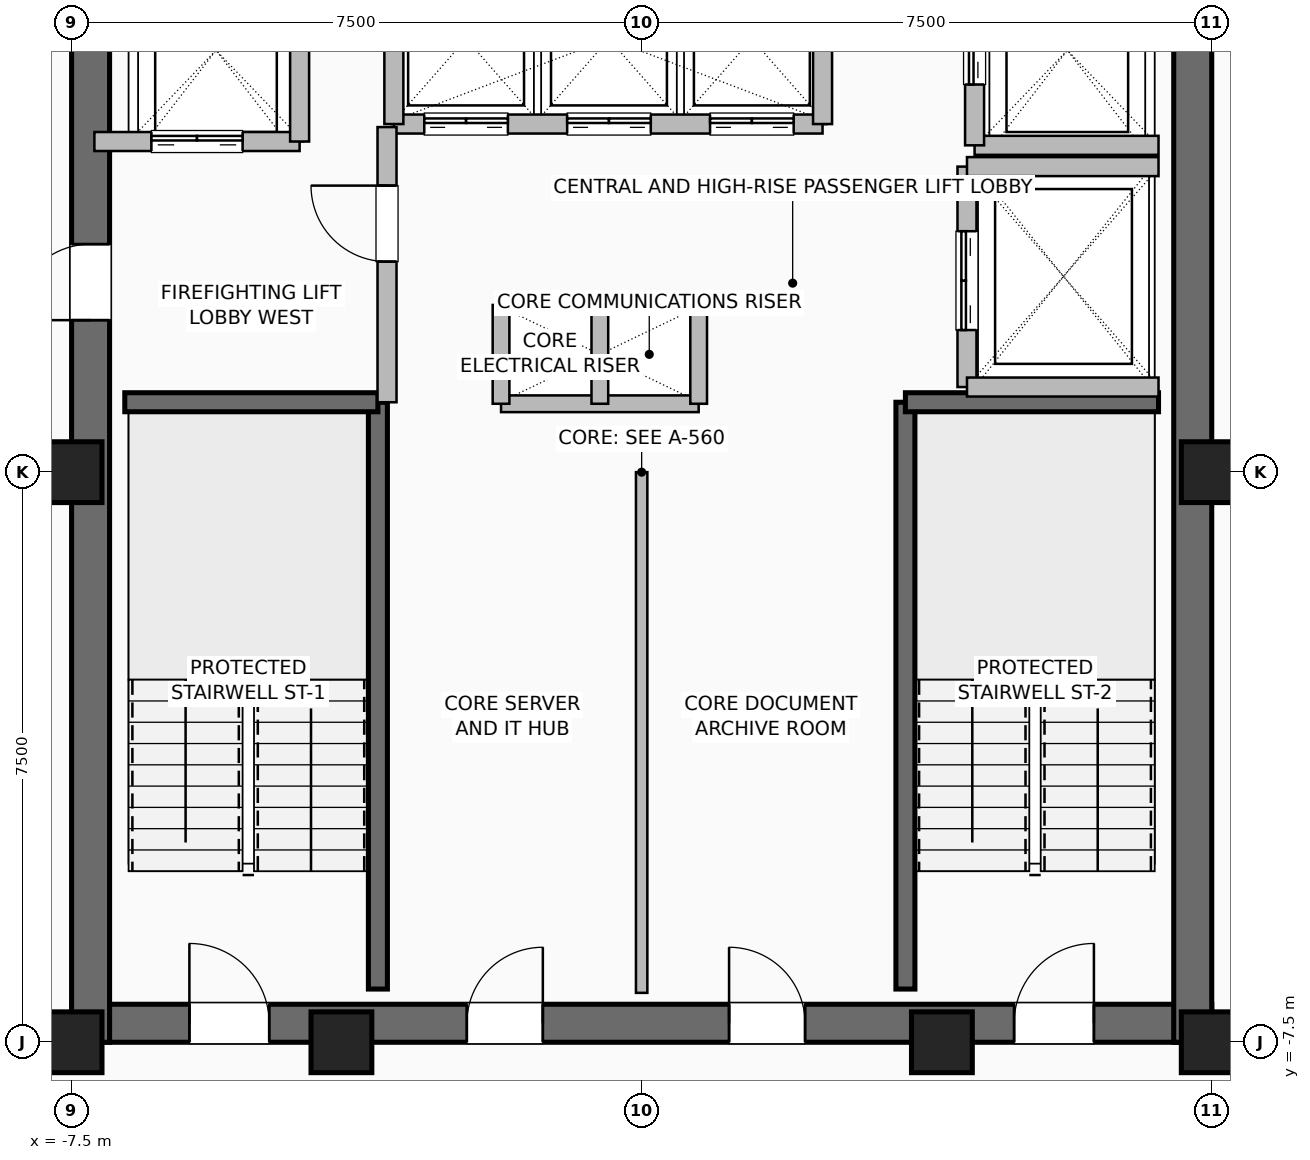
"""IFC4 building model, lengths in metres.
Left out: names, types, materials, properties, quantities, classifications, styles, units other than length and angle.
Written with IfcOpenShell. Run it as: python <this file> out.ifc"""

import sys

from ifc_helpers import new_model, si_unit, direction, frame, frame_2d, origin, origin_2d, place, context, subcontext, project, spatial, rectangle, hollow_rectangle, extrude, element, fill, save


model = new_model("IFC4")
c1 = context("Model", 3, precision=1e-05, world=origin(), true_north=direction((0.0, 1.0)))
c2 = subcontext(c1, "Body", "Model", "MODEL_VIEW")
j1 = project(units=[si_unit("LENGTHUNIT", "METRE"), si_unit("PLANEANGLEUNIT", "RADIAN")], contexts=[c1])
p1 = place(None, origin())
s1 = spatial("IfcSite", under=j1, at=p1, CompositionType="ELEMENT")
p2 = place(p1, origin())
s2 = spatial("IfcBuilding", under=s1, at=p2, CompositionType="ELEMENT")
p3 = place(p2, frame((0.0, 0.0, 239.6)))
s3 = spatial("IfcBuildingStorey", under=s2, at=p3, CompositionType="ELEMENT", Elevation=239.6)
for number, where, z_axis, x_axis in (
    (1, (-7.5, -7.5, 0.0), (0.0, 0.0, 1.0), (1.0, 0.0, 0.0)),
    (2, (-3.95, -7.5, 0.0), (0.0, 0.0, 1.0), (1.0, 0.0, 0.0)),
    (3, (3.95, -7.5, 0.0), (0.0, 0.0, 1.0), (1.0, 0.0, 0.0)),
    (4, (7.5, -7.5, 0.0), (0.0, 0.0, 1.0), (1.0, 0.0, 0.0)),
    (5, (7.5, 0.0, 0.0), (0.0, 0.0, 1.0), (1.0, 0.0, 0.0)),
    (6, (-7.5, 0.0, 0.0), (0.0, 0.0, 1.0), (1.0, 0.0, 0.0)),
):
    element("IfcColumn", number, at=place(p3, frame(where, z_axis=z_axis, x_axis=x_axis)), inside=s3, PredefinedType="COLUMN", context=c2, shape_type="SweptSolid", body=[
        extrude(hollow_rectangle(XDim=0.8, YDim=0.8, WallThickness=0.04, at=origin_2d()), origin(), (0.0, 0.0, 1.0), 3.6),
    ])
p4 = place(p3, frame((-7.5, -7.25, 0.0), z_axis=(0.0, 0.0, 1.0), x_axis=(1.0, 0.0, 0.0)))
e7 = element("IfcWall", 7, at=p4, inside=s3, PredefinedType="SHEAR", context=c2, shape_type="SweptSolid", body=[
    extrude(rectangle(XDim=15.0, YDim=0.5, at=frame_2d((7.5, 0.0))), origin(), (0.0, 0.0, 1.0), 3.36),
])
p5 = place(p4, frame((1.55, 0.0, 0.0)))
e8 = element("IfcOpeningElement", 8, at=p5, cuts=e7, PredefinedType="OPENING", context=c2, shape_type="SweptSolid", body=[
    extrude(rectangle(XDim=1.05, YDim=2.08, at=frame_2d((0.525, 1.04))), frame((0.0, 0.26, 0.0), z_axis=(0.0, -1.0, 0.0), x_axis=(1.0, 0.0, 0.0)), (0.0, 0.0, 1.0), 0.52),
])
p6 = place(p4, frame((12.4, 0.0, 0.0)))
e9 = element("IfcOpeningElement", 9, at=p6, cuts=e7, PredefinedType="OPENING", context=c2, shape_type="SweptSolid", body=[
    extrude(rectangle(XDim=1.05, YDim=2.08, at=frame_2d((0.525, 1.04))), frame((0.0, 0.26, 0.0), z_axis=(0.0, -1.0, 0.0), x_axis=(1.0, 0.0, 0.0)), (0.0, 0.0, 1.0), 0.52),
])
p7 = place(p4, frame((5.2, 0.0, 0.0)))
e10 = element("IfcOpeningElement", 10, at=p7, cuts=e7, PredefinedType="OPENING", context=c2, shape_type="SweptSolid", body=[
    extrude(rectangle(XDim=1.0, YDim=2.08, at=frame_2d((0.5, 1.04))), frame((0.0, 0.26, 0.0), z_axis=(0.0, -1.0, 0.0), x_axis=(1.0, 0.0, 0.0)), (0.0, 0.0, 1.0), 0.52),
])
p8 = place(p4, frame((8.65, 0.0, 0.0)))
e11 = element("IfcOpeningElement", 11, at=p8, cuts=e7, PredefinedType="OPENING", context=c2, shape_type="SweptSolid", body=[
    extrude(rectangle(XDim=1.0, YDim=2.08, at=frame_2d((0.5, 1.04))), frame((0.0, 0.26, 0.0), z_axis=(0.0, -1.0, 0.0), x_axis=(1.0, 0.0, 0.0)), (0.0, 0.0, 1.0), 0.52),
])
p9 = place(p3, frame((-7.25, -7.5, 0.0), z_axis=(0.0, 0.0, 1.0), x_axis=(0.0, 1.0, 0.0)))
e12 = element("IfcWall", 12, at=p9, inside=s3, PredefinedType="SHEAR", context=c2, shape_type="SweptSolid", body=[
    extrude(rectangle(XDim=15.0, YDim=0.5, at=frame_2d((7.5, 0.0))), origin(), (0.0, 0.0, 1.0), 3.36),
])
p10 = place(p9, frame((9.5, 0.0, 0.0)))
e13 = element("IfcOpeningElement", 13, at=p10, cuts=e12, PredefinedType="OPENING", context=c2, shape_type="SweptSolid", body=[
    extrude(rectangle(XDim=1.0, YDim=2.08, at=frame_2d((0.5, 1.04))), frame((0.0, 0.26, 0.0), z_axis=(0.0, -1.0, 0.0), x_axis=(1.0, 0.0, 0.0)), (0.0, 0.0, 1.0), 0.52),
])
p11 = place(p3, frame((7.25, -7.5, 0.0), z_axis=(0.0, 0.0, 1.0), x_axis=(0.0, 1.0, 0.0)))
e14 = element("IfcWall", 14, at=p11, inside=s3, PredefinedType="SHEAR", context=c2, shape_type="SweptSolid", body=[
    extrude(rectangle(XDim=15.0, YDim=0.5, at=frame_2d((7.5, 0.0))), origin(), (0.0, 0.0, 1.0), 3.36),
])
p12 = place(p3, frame((-3.47, -6.8, 0.0), z_axis=(0.0, 0.0, 1.0), x_axis=(0.0, 1.0, 0.0)))
e15 = element("IfcWall", 15, at=p12, inside=s3, PredefinedType="SHEAR", context=c2, shape_type="SweptSolid", body=[
    extrude(rectangle(XDim=7.72, YDim=0.25, at=frame_2d((3.86, 0.0))), origin(), (0.0, 0.0, 1.0), 3.36),
])
p13 = place(p3, frame((-6.8, 0.92, 0.0), z_axis=(0.0, 0.0, 1.0), x_axis=(1.0, 0.0, 0.0)))
e16 = element("IfcWall", 16, at=p13, inside=s3, PredefinedType="SHEAR", context=c2, shape_type="SweptSolid", body=[
    extrude(rectangle(XDim=3.33, YDim=0.25, at=frame_2d((1.665, 0.0))), origin(), (0.0, 0.0, 1.0), 3.36),
])
p14 = place(p3, frame((3.47, -6.8, 0.0), z_axis=(0.0, 0.0, 1.0), x_axis=(0.0, 1.0, 0.0)))
e17 = element("IfcWall", 17, at=p14, inside=s3, PredefinedType="SHEAR", context=c2, shape_type="SweptSolid", body=[
    extrude(rectangle(XDim=7.72, YDim=0.25, at=frame_2d((3.86, 0.0))), origin(), (0.0, 0.0, 1.0), 3.36),
])
p15 = place(p3, frame((3.47, 0.92, 0.0), z_axis=(0.0, 0.0, 1.0), x_axis=(1.0, 0.0, 0.0)))
e18 = element("IfcWall", 18, at=p15, inside=s3, PredefinedType="SHEAR", context=c2, shape_type="SweptSolid", body=[
    extrude(rectangle(XDim=3.33, YDim=0.25, at=frame_2d((1.665, 0.0))), origin(), (0.0, 0.0, 1.0), 3.36),
])
for number, where, z_axis, x_axis in (
    (19, (-1.85, 2.2, 0.0), (0.0, 0.0, 1.0), (1.0, 0.0, 0.0)),
    (20, (-1.85, 0.9, 0.0), (0.0, 0.0, 1.0), (1.0, 0.0, 0.0)),
):
    element("IfcWall", number, at=place(p3, frame(where, z_axis=z_axis, x_axis=x_axis)), inside=s3, PredefinedType="PARTITIONING", context=c2, shape_type="SweptSolid", body=[
        extrude(rectangle(XDim=2.6, YDim=0.22, at=frame_2d((1.3, 0.0))), origin(), (0.0, 0.0, 1.0), 3.36),
    ])
for number, where, z_axis, x_axis in (
    (21, (-0.55, 0.9, 0.0), (0.0, 0.0, 1.0), (0.0, 1.0, 0.0)),
    (22, (0.75, 0.9, 0.0), (0.0, 0.0, 1.0), (0.0, 1.0, 0.0)),
    (23, (-1.85, 0.9, 0.0), (0.0, 0.0, 1.0), (0.0, 1.0, 0.0)),
):
    element("IfcWall", number, at=place(p3, frame(where, z_axis=z_axis, x_axis=x_axis)), inside=s3, PredefinedType="PARTITIONING", context=c2, shape_type="SweptSolid", body=[
        extrude(rectangle(XDim=1.3, YDim=0.22, at=frame_2d((0.65, 0.0))), origin(), (0.0, 0.0, 1.0), 3.36),
    ])
p16 = place(p3, frame((-3.26, 4.58, 0.0), z_axis=(0.0, 0.0, 1.0), x_axis=(1.0, 0.0, 0.0)))
e24 = element("IfcWall", 24, at=p16, inside=s3, PredefinedType="SHEAR", context=c2, shape_type="SweptSolid", body=[
    extrude(rectangle(XDim=5.64, YDim=0.25, at=frame_2d((2.82, 0.0))), origin(), (0.0, 0.0, 1.0), 3.36),
])
p17 = place(p16, frame((0.4, 0.0, 0.0)))
e25 = element("IfcOpeningElement", 25, at=p17, cuts=e24, PredefinedType="OPENING", context=c2, shape_type="SweptSolid", body=[
    extrude(rectangle(XDim=1.1, YDim=2.2, at=frame_2d((0.55, 1.1))), frame((0.0, 0.135, 0.0), z_axis=(0.0, -1.0, 0.0), x_axis=(1.0, 0.0, 0.0)), (0.0, 0.0, 1.0), 0.27),
])
p18 = place(p16, frame((2.28, 0.0, 0.0)))
e26 = element("IfcOpeningElement", 26, at=p18, cuts=e24, PredefinedType="OPENING", context=c2, shape_type="SweptSolid", body=[
    extrude(rectangle(XDim=1.1, YDim=2.2, at=frame_2d((0.55, 1.1))), frame((0.0, 0.135, 0.0), z_axis=(0.0, -1.0, 0.0), x_axis=(1.0, 0.0, 0.0)), (0.0, 0.0, 1.0), 0.27),
])
p19 = place(p16, frame((4.16, 0.0, 0.0)))
e27 = element("IfcOpeningElement", 27, at=p19, cuts=e24, PredefinedType="OPENING", context=c2, shape_type="SweptSolid", body=[
    extrude(rectangle(XDim=1.1, YDim=2.2, at=frame_2d((0.55, 1.1))), frame((0.0, 0.135, 0.0), z_axis=(0.0, -1.0, 0.0), x_axis=(1.0, 0.0, 0.0)), (0.0, 0.0, 1.0), 0.27),
])
for number, where, z_axis, x_axis in (
    (28, (-3.26, 4.58, 0.0), (0.0, 0.0, 1.0), (0.0, 1.0, 0.0)),
    (29, (2.38, 4.58, 0.0), (0.0, 0.0, 1.0), (0.0, 1.0, 0.0)),
):
    element("IfcWall", number, at=place(p3, frame(where, z_axis=z_axis, x_axis=x_axis)), inside=s3, PredefinedType="SHEAR", context=c2, shape_type="SweptSolid", body=[
        extrude(rectangle(XDim=2.22, YDim=0.25, at=frame_2d((1.11, 0.0))), origin(), (0.0, 0.0, 1.0), 3.36),
    ])
p20 = place(p3, frame((-7.2, 4.35, 0.0), z_axis=(0.0, 0.0, 1.0), x_axis=(1.0, 0.0, 0.0)))
e30 = element("IfcWall", 30, at=p20, inside=s3, PredefinedType="SHEAR", context=c2, shape_type="SweptSolid", body=[
    extrude(rectangle(XDim=2.7, YDim=0.25, at=frame_2d((1.35, 0.0))), origin(), (0.0, 0.0, 1.0), 3.36),
])
p21 = place(p20, frame((0.75, 0.0, 0.0)))
e31 = element("IfcOpeningElement", 31, at=p21, cuts=e30, PredefinedType="OPENING", context=c2, shape_type="SweptSolid", body=[
    extrude(rectangle(XDim=1.2, YDim=2.2, at=frame_2d((0.6, 1.1))), frame((0.0, 0.135, 0.0), z_axis=(0.0, -1.0, 0.0), x_axis=(1.0, 0.0, 0.0)), (0.0, 0.0, 1.0), 0.27),
])
p22 = place(p3, frame((-4.5, 4.35, 0.0), z_axis=(0.0, 0.0, 1.0), x_axis=(0.0, 1.0, 0.0)))
e32 = element("IfcWall", 32, at=p22, inside=s3, PredefinedType="SHEAR", context=c2, shape_type="SweptSolid", body=[
    extrude(rectangle(XDim=2.85, YDim=0.25, at=frame_2d((1.425, 0.0))), origin(), (0.0, 0.0, 1.0), 3.36),
])
p23 = place(p3, frame((4.38, 4.3, 0.0), z_axis=(0.0, 0.0, 1.0), x_axis=(1.0, 0.0, 0.0)))
e33 = element("IfcWall", 33, at=p23, inside=s3, PredefinedType="SHEAR", context=c2, shape_type="SweptSolid", body=[
    extrude(rectangle(XDim=2.42, YDim=0.25, at=frame_2d((1.21, 0.0))), origin(), (0.0, 0.0, 1.0), 3.36),
])
p24 = place(p3, frame((4.38, 4.3, 0.0), z_axis=(0.0, 0.0, 1.0), x_axis=(0.0, 1.0, 0.0)))
e34 = element("IfcWall", 34, at=p24, inside=s3, PredefinedType="SHEAR", context=c2, shape_type="SweptSolid", body=[
    extrude(rectangle(XDim=2.5, YDim=0.25, at=frame_2d((1.25, 0.0))), origin(), (0.0, 0.0, 1.0), 3.36),
])
p25 = place(p24, frame((0.8, 0.0, 0.0)))
e35 = element("IfcOpeningElement", 35, at=p25, cuts=e34, PredefinedType="OPENING", context=c2, shape_type="SweptSolid", body=[
    extrude(rectangle(XDim=1.2, YDim=2.2, at=frame_2d((0.6, 1.1))), frame((0.0, 0.135, 0.0), z_axis=(0.0, -1.0, 0.0), x_axis=(1.0, 0.0, 0.0)), (0.0, 0.0, 1.0), 0.27),
])
p26 = place(p3, frame((4.28, 1.12, 0.0), z_axis=(0.0, 0.0, 1.0), x_axis=(0.0, 1.0, 0.0)))
e36 = element("IfcWall", 36, at=p26, inside=s3, PredefinedType="SHEAR", context=c2, shape_type="SweptSolid", body=[
    extrude(rectangle(XDim=2.9, YDim=0.25, at=frame_2d((1.45, 0.0))), origin(), (0.0, 0.0, 1.0), 3.36),
])
p27 = place(p26, frame((0.75, 0.0, 0.0)))
e37 = element("IfcOpeningElement", 37, at=p27, cuts=e36, PredefinedType="OPENING", context=c2, shape_type="SweptSolid", body=[
    extrude(rectangle(XDim=1.3, YDim=2.3, at=frame_2d((0.65, 1.15))), frame((0.0, 0.135, 0.0), z_axis=(0.0, -1.0, 0.0), x_axis=(1.0, 0.0, 0.0)), (0.0, 0.0, 1.0), 0.27),
])
for number, where, z_axis, x_axis in (
    (38, (4.28, 1.12, 0.0), (0.0, 0.0, 1.0), (1.0, 0.0, 0.0)),
    (39, (4.28, 4.02, 0.0), (0.0, 0.0, 1.0), (1.0, 0.0, 0.0)),
):
    element("IfcWall", number, at=place(p3, frame(where, z_axis=z_axis, x_axis=x_axis)), inside=s3, PredefinedType="SHEAR", context=c2, shape_type="SweptSolid", body=[
        extrude(rectangle(XDim=2.52, YDim=0.25, at=frame_2d((1.26, 0.0))), origin(), (0.0, 0.0, 1.0), 3.36),
    ])
p28 = place(p3, frame((-3.35, 0.92, 0.0), z_axis=(0.0, 0.0, 1.0), x_axis=(0.0, 1.0, 0.0)))
e40 = element("IfcWall", 40, at=p28, inside=s3, PredefinedType="SHEAR", context=c2, shape_type="SweptSolid", body=[
    extrude(rectangle(XDim=3.62, YDim=0.25, at=frame_2d((1.81, 0.0))), origin(), (0.0, 0.0, 1.0), 3.36),
])
p29 = place(p28, frame((1.85, 0.0, 0.0)))
e41 = element("IfcOpeningElement", 41, at=p29, cuts=e40, PredefinedType="OPENING", context=c2, shape_type="SweptSolid", body=[
    extrude(rectangle(XDim=1.0, YDim=2.08, at=frame_2d((0.5, 1.04))), frame((0.0, 0.135, 0.0), z_axis=(0.0, -1.0, 0.0), x_axis=(1.0, 0.0, 0.0)), (0.0, 0.0, 1.0), 0.27),
])
p30 = place(p3, frame((0.0, -6.85, 0.0), z_axis=(0.0, 0.0, 1.0), x_axis=(0.0, 1.0, 0.0)))
e42 = element("IfcWall", 42, at=p30, inside=s3, PredefinedType="PARTITIONING", context=c2, shape_type="SweptSolid", body=[
    extrude(rectangle(XDim=6.85, YDim=0.15, at=frame_2d((3.425, 0.0))), origin(), (0.0, 0.0, 1.0), 3.36),
])
p31 = place(p3, frame((7.45, -7.48, 0.0), z_axis=(0.0, 0.0, 1.0), x_axis=(1.0, 0.0, 0.0)))
e43 = element("IfcWall", 43, at=p31, inside=s3, PredefinedType="PARTITIONING", context=c2, shape_type="SweptSolid", body=[
    extrude(rectangle(XDim=0.95, YDim=0.15, at=frame_2d((0.475, 0.0))), origin(), (0.0, 0.0, 1.0), 3.36),
])
p32 = place(p5, origin())
e44 = element("IfcDoor", 44, at=p32, inside=s3, OperationType="SINGLE_SWING_LEFT", PredefinedType="DOOR", context=c2, shape_type="SweptSolid", body=[
    extrude(rectangle(XDim=1.05, YDim=2.08, at=frame_2d((0.525, 1.04))), frame((0.0, 0.025, 0.0), z_axis=(0.0, -1.0, 0.0), x_axis=(1.0, 0.0, 0.0)), (0.0, 0.0, 1.0), 0.05),
])
fill(e8, e44)
p33 = place(p6, origin())
e45 = element("IfcDoor", 45, at=p33, inside=s3, OperationType="SINGLE_SWING_RIGHT", PredefinedType="DOOR", context=c2, shape_type="SweptSolid", body=[
    extrude(rectangle(XDim=1.05, YDim=2.08, at=frame_2d((0.525, 1.04))), frame((0.0, 0.025, 0.0), z_axis=(0.0, -1.0, 0.0), x_axis=(1.0, 0.0, 0.0)), (0.0, 0.0, 1.0), 0.05),
])
fill(e9, e45)
p34 = place(p10, origin())
e46 = element("IfcDoor", 46, at=p34, inside=s3, OperationType="SINGLE_SWING_LEFT", PredefinedType="DOOR", context=c2, shape_type="SweptSolid", body=[
    extrude(rectangle(XDim=1.0, YDim=2.08, at=frame_2d((0.5, 1.04))), frame((0.0, 0.025, 0.0), z_axis=(0.0, -1.0, 0.0), x_axis=(1.0, 0.0, 0.0)), (0.0, 0.0, 1.0), 0.05),
])
fill(e13, e46)
p35 = place(p7, origin())
e47 = element("IfcDoor", 47, at=p35, inside=s3, OperationType="SINGLE_SWING_RIGHT", PredefinedType="DOOR", context=c2, shape_type="SweptSolid", body=[
    extrude(rectangle(XDim=1.0, YDim=2.08, at=frame_2d((0.5, 1.04))), frame((0.0, 0.025, 0.0), z_axis=(0.0, -1.0, 0.0), x_axis=(1.0, 0.0, 0.0)), (0.0, 0.0, 1.0), 0.05),
])
fill(e10, e47)
p36 = place(p8, origin())
e48 = element("IfcDoor", 48, at=p36, inside=s3, OperationType="SINGLE_SWING_LEFT", PredefinedType="DOOR", context=c2, shape_type="SweptSolid", body=[
    extrude(rectangle(XDim=1.0, YDim=2.08, at=frame_2d((0.5, 1.04))), frame((0.0, 0.025, 0.0), z_axis=(0.0, -1.0, 0.0), x_axis=(1.0, 0.0, 0.0)), (0.0, 0.0, 1.0), 0.05),
])
fill(e11, e48)
p37 = place(p17, origin())
e49 = element("IfcDoor", 49, at=p37, inside=s3, OperationType="DOUBLE_DOOR_SLIDING", PredefinedType="DOOR", context=c2, shape_type="SweptSolid", body=[
    extrude(rectangle(XDim=1.1, YDim=2.2, at=frame_2d((0.55, 1.1))), frame((0.0, 0.025, 0.0), z_axis=(0.0, -1.0, 0.0), x_axis=(1.0, 0.0, 0.0)), (0.0, 0.0, 1.0), 0.05),
])
fill(e25, e49)
p38 = place(p18, origin())
e50 = element("IfcDoor", 50, at=p38, inside=s3, OperationType="DOUBLE_DOOR_SLIDING", PredefinedType="DOOR", context=c2, shape_type="SweptSolid", body=[
    extrude(rectangle(XDim=1.1, YDim=2.2, at=frame_2d((0.55, 1.1))), frame((0.0, 0.025, 0.0), z_axis=(0.0, -1.0, 0.0), x_axis=(1.0, 0.0, 0.0)), (0.0, 0.0, 1.0), 0.05),
])
fill(e26, e50)
p39 = place(p19, origin())
e51 = element("IfcDoor", 51, at=p39, inside=s3, OperationType="DOUBLE_DOOR_SLIDING", PredefinedType="DOOR", context=c2, shape_type="SweptSolid", body=[
    extrude(rectangle(XDim=1.1, YDim=2.2, at=frame_2d((0.55, 1.1))), frame((0.0, 0.025, 0.0), z_axis=(0.0, -1.0, 0.0), x_axis=(1.0, 0.0, 0.0)), (0.0, 0.0, 1.0), 0.05),
])
fill(e27, e51)
p40 = place(p21, origin())
e52 = element("IfcDoor", 52, at=p40, inside=s3, OperationType="DOUBLE_DOOR_SLIDING", PredefinedType="DOOR", context=c2, shape_type="SweptSolid", body=[
    extrude(rectangle(XDim=1.2, YDim=2.2, at=frame_2d((0.6, 1.1))), frame((0.0, 0.025, 0.0), z_axis=(0.0, -1.0, 0.0), x_axis=(1.0, 0.0, 0.0)), (0.0, 0.0, 1.0), 0.05),
])
fill(e31, e52)
p41 = place(p25, origin())
e53 = element("IfcDoor", 53, at=p41, inside=s3, OperationType="DOUBLE_DOOR_SLIDING", PredefinedType="DOOR", context=c2, shape_type="SweptSolid", body=[
    extrude(rectangle(XDim=1.2, YDim=2.2, at=frame_2d((0.6, 1.1))), frame((0.0, 0.025, 0.0), z_axis=(0.0, -1.0, 0.0), x_axis=(1.0, 0.0, 0.0)), (0.0, 0.0, 1.0), 0.05),
])
fill(e35, e53)
p42 = place(p27, origin())
e54 = element("IfcDoor", 54, at=p42, inside=s3, OperationType="DOUBLE_DOOR_SLIDING", PredefinedType="DOOR", context=c2, shape_type="SweptSolid", body=[
    extrude(rectangle(XDim=1.3, YDim=2.3, at=frame_2d((0.65, 1.15))), frame((0.0, 0.025, 0.0), z_axis=(0.0, -1.0, 0.0), x_axis=(1.0, 0.0, 0.0)), (0.0, 0.0, 1.0), 0.05),
])
fill(e37, e54)
p43 = place(p29, origin())
e55 = element("IfcDoor", 55, at=p43, inside=s3, OperationType="SINGLE_SWING_RIGHT", PredefinedType="DOOR", context=c2, shape_type="SweptSolid", body=[
    extrude(rectangle(XDim=1.0, YDim=2.08, at=frame_2d((0.5, 1.04))), frame((0.0, 0.025, 0.0), z_axis=(0.0, -1.0, 0.0), x_axis=(1.0, 0.0, 0.0)), (0.0, 0.0, 1.0), 0.05),
])
fill(e41, e55)
save(model, sys.argv[1])
